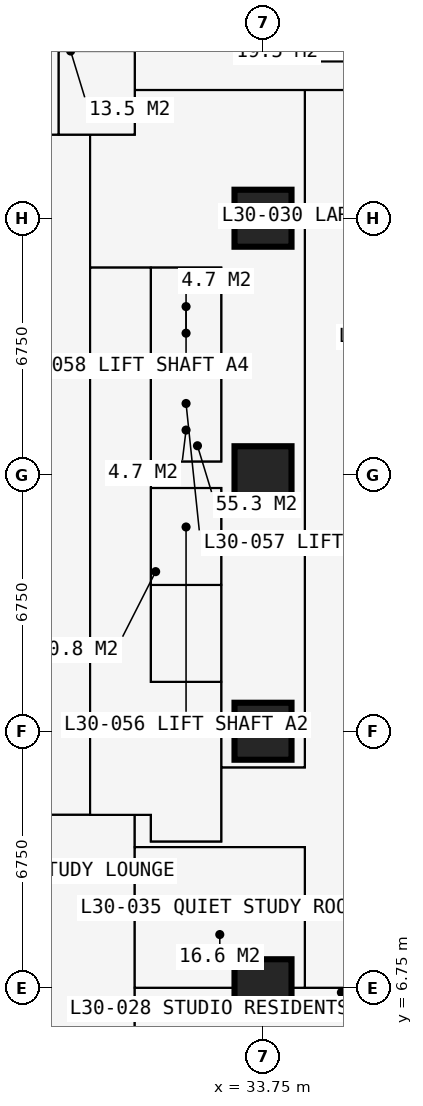
"""IFC4 building model, lengths in metres.
Left out: names, types, materials, properties, quantities, classifications, styles, units other than length and angle.
Written with IfcOpenShell. Run it as: python <this file> out.ifc"""

import sys

from ifc_helpers import new_model, si_unit, direction, frame, frame_2d, origin, origin_2d, place, context, subcontext, project, spatial, rectangle, extrude, element, fill, save


model = new_model("IFC4")
c1 = context("Model", 3, precision=1e-05, world=origin(), true_north=direction((0.0, 1.0)))
c2 = subcontext(c1, "Body", "Model", "MODEL_VIEW")
j1 = project(units=[si_unit("LENGTHUNIT", "METRE"), si_unit("PLANEANGLEUNIT", "RADIAN")], contexts=[c1])
p1 = place(None, origin())
s1 = spatial("IfcSite", under=j1, at=p1, CompositionType="ELEMENT")
p2 = place(p1, origin())
s2 = spatial("IfcBuilding", under=s1, at=p2, CompositionType="ELEMENT")
p3 = place(p2, frame((0.0, 0.0, 112.5)))
s3 = spatial("IfcBuildingStorey", under=s2, at=p3, CompositionType="ELEMENT", Elevation=112.5)
for number, where, z_axis, x_axis in (
    (1, (33.75, 6.75, 0.0), (0.0, 0.0, 1.0), (1.0, 0.0, 0.0)),
    (2, (33.75, 13.5, 0.0), (0.0, 0.0, 1.0), (1.0, 0.0, 0.0)),
    (3, (33.75, 20.25, 0.0), (0.0, 0.0, 1.0), (1.0, 0.0, 0.0)),
    (4, (33.75, 27.0, 0.0), (0.0, 0.0, 1.0), (1.0, 0.0, 0.0)),
):
    element("IfcColumn", number, at=place(p3, frame(where, z_axis=z_axis, x_axis=x_axis)), inside=s3, PredefinedType="COLUMN", context=c2, shape_type="SweptSolid", body=[
        extrude(rectangle(XDim=1.5, YDim=1.5, at=origin_2d()), origin(), (0.0, 0.0, 1.0), 3.6),
    ])
p4 = place(p3, frame((37.875, 31.125, 0.0), z_axis=(0.0, 0.0, 1.0), x_axis=(-1.0, 0.0, 0.0)))
e5 = element("IfcWall", 5, at=p4, inside=s3, PredefinedType="SOLIDWALL", context=c2, shape_type="SweptSolid", body=[
    extrude(rectangle(XDim=3.375, YDim=0.3, at=frame_2d((1.688, 0.0))), origin(), (0.0, 0.0, 1.0), 3.375),
])
p5 = place(p4, frame((0.788, 0.0, 0.6)))
e6 = element("IfcOpeningElement", 6, at=p5, cuts=e5, PredefinedType="OPENING", context=c2, shape_type="SweptSolid", body=[
    extrude(rectangle(XDim=1.8, YDim=2.1, at=frame_2d((0.9, 1.05))), frame((0.0, 0.16, 0.0), z_axis=(0.0, -1.0, 0.0), x_axis=(1.0, 0.0, 0.0)), (0.0, 0.0, 1.0), 0.32),
])
p6 = place(p3, frame((34.5, 31.125, 0.0), z_axis=(0.0, 0.0, 1.0), x_axis=(0.0, 1.0, 0.0)))
e7 = element("IfcWall", 7, at=p6, inside=s3, PredefinedType="SOLIDWALL", context=c2, shape_type="SweptSolid", body=[
    extrude(rectangle(XDim=3.375, YDim=0.3, at=frame_2d((1.688, 0.0))), origin(), (0.0, 0.0, 1.0), 3.375),
])
p7 = place(p6, frame((0.268, 0.0, 0.9)))
e8 = element("IfcOpeningElement", 8, at=p7, cuts=e7, PredefinedType="OPENING", context=c2, shape_type="SweptSolid", body=[
    extrude(rectangle(XDim=1.5, YDim=1.8, at=frame_2d((0.75, 0.9))), frame((0.0, 0.16, 0.0), z_axis=(0.0, -1.0, 0.0), x_axis=(1.0, 0.0, 0.0)), (0.0, 0.0, 1.0), 0.32),
])
p8 = place(p3, frame((10.125, 11.3, 0.0), z_axis=(0.0, 0.0, 1.0), x_axis=(1.0, 0.0, 0.0)))
e9 = element("IfcWall", 9, at=p8, inside=s3, PredefinedType="PARTITIONING", context=c2, shape_type="SweptSolid", body=[
    extrude(rectangle(XDim=20.675, YDim=0.15, at=frame_2d((10.337, 0.0))), origin(), (0.0, 0.0, 1.0), 3.375),
])
p9 = place(p8, frame((11.312, 0.0, 0.0)))
e10 = element("IfcOpeningElement", 10, at=p9, cuts=e9, PredefinedType="OPENING", context=c2, shape_type="SweptSolid", body=[
    extrude(rectangle(XDim=1.0, YDim=2.2, at=frame_2d((0.5, 1.1))), frame((0.0, 0.085, 0.0), z_axis=(0.0, -1.0, 0.0), x_axis=(1.0, 0.0, 0.0)), (0.0, 0.0, 1.0), 0.17),
])
p10 = place(p3, frame((11.3, 29.2, 0.0), z_axis=(0.0, 0.0, 1.0), x_axis=(1.0, 0.0, 0.0)))
e11 = element("IfcWall", 11, at=p10, inside=s3, PredefinedType="PARTITIONING", context=c2, shape_type="SweptSolid", body=[
    extrude(rectangle(XDim=19.075, YDim=0.1, at=frame_2d((9.538, 0.0))), origin(), (0.0, 0.0, 1.0), 3.375),
])
p11 = place(p10, frame((6.4, 0.0, 0.0)))
e12 = element("IfcOpeningElement", 12, at=p11, cuts=e11, PredefinedType="OPENING", context=c2, shape_type="SweptSolid", body=[
    extrude(rectangle(XDim=0.95, YDim=2.2, at=frame_2d((0.475, 1.1))), frame((0.0, 0.06, 0.0), z_axis=(0.0, -1.0, 0.0), x_axis=(1.0, 0.0, 0.0)), (0.0, 0.0, 1.0), 0.12),
])
p12 = place(p10, frame((13.15, 0.0, 0.0)))
e13 = element("IfcOpeningElement", 13, at=p12, cuts=e11, PredefinedType="OPENING", context=c2, shape_type="SweptSolid", body=[
    extrude(rectangle(XDim=0.95, YDim=2.2, at=frame_2d((0.475, 1.1))), frame((0.0, 0.06, 0.0), z_axis=(0.0, -1.0, 0.0), x_axis=(1.0, 0.0, 0.0)), (0.0, 0.0, 1.0), 0.12),
])
p13 = place(p10, frame((15.95, 0.0, 0.0)))
e14 = element("IfcOpeningElement", 14, at=p13, cuts=e11, PredefinedType="OPENING", context=c2, shape_type="SweptSolid", body=[
    extrude(rectangle(XDim=0.95, YDim=2.2, at=frame_2d((0.475, 1.1))), frame((0.0, 0.06, 0.0), z_axis=(0.0, -1.0, 0.0), x_axis=(1.0, 0.0, 0.0)), (0.0, 0.0, 1.0), 0.12),
])
p14 = place(p10, frame((0.6, 0.0, 0.0)))
e15 = element("IfcOpeningElement", 15, at=p14, cuts=e11, PredefinedType="OPENING", context=c2, shape_type="SweptSolid", body=[
    extrude(rectangle(XDim=1.0, YDim=2.2, at=frame_2d((0.5, 1.1))), frame((0.0, 0.06, 0.0), z_axis=(0.0, -1.0, 0.0), x_axis=(1.0, 0.0, 0.0)), (0.0, 0.0, 1.0), 0.12),
])
p15 = place(p3, frame((28.375, 29.2, 0.0), z_axis=(0.0, 0.0, 1.0), x_axis=(0.0, 1.0, 0.0)))
e16 = element("IfcWall", 16, at=p15, inside=s3, PredefinedType="PARTITIONING", context=c2, shape_type="SweptSolid", body=[
    extrude(rectangle(XDim=2.2, YDim=0.1, at=frame_2d((1.1, 0.0))), origin(), (0.0, 0.0, 1.0), 3.375),
])
p16 = place(p15, frame((0.65, 0.0, 0.0)))
e17 = element("IfcOpeningElement", 17, at=p16, cuts=e16, PredefinedType="OPENING", context=c2, shape_type="SweptSolid", body=[
    extrude(rectangle(XDim=0.9, YDim=2.2, at=frame_2d((0.45, 1.1))), frame((0.0, 0.06, 0.0), z_axis=(0.0, -1.0, 0.0), x_axis=(1.0, 0.0, 0.0)), (0.0, 0.0, 1.0), 0.12),
])
p17 = place(p3, frame((28.375, 31.4, 0.0), z_axis=(0.0, 0.0, 1.0), x_axis=(1.0, 0.0, 0.0)))
e18 = element("IfcWall", 18, at=p17, inside=s3, PredefinedType="PARTITIONING", context=c2, shape_type="SweptSolid", body=[
    extrude(rectangle(XDim=2.0, YDim=0.1, at=frame_2d((1.0, 0.0))), origin(), (0.0, 0.0, 1.0), 3.375),
])
p18 = place(p3, frame((29.2, 11.3, 0.0), z_axis=(0.0, 0.0, 1.0), x_axis=(0.0, 1.0, 0.0)))
e19 = element("IfcWall", 19, at=p18, inside=s3, PredefinedType="PARTITIONING", context=c2, shape_type="SweptSolid", body=[
    extrude(rectangle(XDim=17.9, YDim=0.2, at=frame_2d((8.95, 0.0))), origin(), (0.0, 0.0, 1.0), 3.375),
])
p19 = place(p18, frame((8.35, 0.0, 0.0)))
e20 = element("IfcOpeningElement", 20, at=p19, cuts=e19, PredefinedType="OPENING", context=c2, shape_type="SweptSolid", body=[
    extrude(rectangle(XDim=1.2, YDim=2.2, at=frame_2d((0.6, 1.1))), frame((0.0, 0.11, 0.0), z_axis=(0.0, -1.0, 0.0), x_axis=(1.0, 0.0, 0.0)), (0.0, 0.0, 1.0), 0.22),
])
p20 = place(p3, frame((29.2, 25.7, 0.0), z_axis=(0.0, 0.0, 1.0), x_axis=(1.0, 0.0, 0.0)))
e21 = element("IfcWall", 21, at=p20, inside=s3, PredefinedType="SHEAR", context=c2, shape_type="SweptSolid", body=[
    extrude(rectangle(XDim=3.45, YDim=0.1, at=frame_2d((1.725, 0.0))), origin(), (0.0, 0.0, 1.0), 3.375),
])
p21 = place(p3, frame((30.375, -0.734, 0.0), z_axis=(0.0, 0.0, 1.0), x_axis=(0.0, 1.0, 0.0)))
e22 = element("IfcWall", 22, at=p21, inside=s3, PredefinedType="PARTITIONING", context=c2, shape_type="SweptSolid", body=[
    extrude(rectangle(XDim=12.034, YDim=0.15, at=frame_2d((6.017, 0.0))), origin(), (0.0, 0.0, 1.0), 3.375),
])
p22 = place(p21, frame((5.134, 0.0, 0.0)))
e23 = element("IfcOpeningElement", 23, at=p22, cuts=e22, PredefinedType="OPENING", context=c2, shape_type="SweptSolid", body=[
    extrude(rectangle(XDim=1.0, YDim=2.2, at=frame_2d((0.5, 1.1))), frame((0.0, 0.085, 0.0), z_axis=(0.0, -1.0, 0.0), x_axis=(1.0, 0.0, 0.0)), (0.0, 0.0, 1.0), 0.17),
])
p23 = place(p3, frame((30.375, 6.75, 0.0), z_axis=(0.0, 0.0, 1.0), x_axis=(1.0, 0.0, 0.0)))
e24 = element("IfcWall", 24, at=p23, inside=s3, PredefinedType="PARTITIONING", context=c2, shape_type="SweptSolid", body=[
    extrude(rectangle(XDim=5.975, YDim=0.15, at=frame_2d((2.988, 0.0))), origin(), (0.0, 0.0, 1.0), 2.877),
])
p24 = place(p3, frame((30.375, 10.45, 0.0), z_axis=(0.0, 0.0, 1.0), x_axis=(1.0, 0.0, 0.0)))
e25 = element("IfcWall", 25, at=p24, inside=s3, PredefinedType="PARTITIONING", context=c2, shape_type="SweptSolid", body=[
    extrude(rectangle(XDim=4.475, YDim=0.15, at=frame_2d((2.238, 0.0))), origin(), (0.0, 0.0, 1.0), 3.375),
])
p25 = place(p24, frame((2.35, 0.0, 0.0)))
e26 = element("IfcOpeningElement", 26, at=p25, cuts=e25, PredefinedType="OPENING", context=c2, shape_type="SweptSolid", body=[
    extrude(rectangle(XDim=0.95, YDim=2.2, at=frame_2d((0.475, 1.1))), frame((0.0, 0.085, 0.0), z_axis=(0.0, -1.0, 0.0), x_axis=(1.0, 0.0, 0.0)), (0.0, 0.0, 1.0), 0.17),
])
p26 = place(p3, frame((30.375, 29.2, 0.0), z_axis=(0.0, 0.0, 1.0), x_axis=(0.0, 1.0, 0.0)))
e27 = element("IfcWall", 27, at=p26, inside=s3, PredefinedType="PARTITIONING", context=c2, shape_type="SweptSolid", body=[
    extrude(rectangle(XDim=5.284, YDim=0.15, at=frame_2d((2.642, 0.0))), origin(), (0.0, 0.0, 1.0), 3.375),
])
p27 = place(p3, frame((30.375, 30.375, 0.0), z_axis=(0.0, 0.0, 1.0), x_axis=(1.0, 0.0, 0.0)))
e28 = element("IfcWall", 28, at=p27, inside=s3, PredefinedType="PARTITIONING", context=c2, shape_type="SweptSolid", body=[
    extrude(rectangle(XDim=7.35, YDim=0.15, at=frame_2d((3.675, 0.0))), origin(), (0.0, 0.0, 1.0), 2.877),
])
p28 = place(p27, frame((5.225, 0.0, 0.0)))
e29 = element("IfcOpeningElement", 29, at=p28, cuts=e28, PredefinedType="OPENING", context=c2, shape_type="SweptSolid", body=[
    extrude(rectangle(XDim=1.0, YDim=2.2, at=frame_2d((0.5, 1.1))), frame((0.0, 0.085, 0.0), z_axis=(0.0, -1.0, 0.0), x_axis=(1.0, 0.0, 0.0)), (0.0, 0.0, 1.0), 0.17),
])
p29 = place(p3, frame((30.8, 10.6, 0.0), z_axis=(0.0, 0.0, 1.0), x_axis=(0.0, 1.0, 0.0)))
e30 = element("IfcWall", 30, at=p29, inside=s3, PredefinedType="PARTITIONING", context=c2, shape_type="SweptSolid", body=[
    extrude(rectangle(XDim=0.7, YDim=0.15, at=frame_2d((0.35, 0.0))), origin(), (0.0, 0.0, 1.0), 3.375),
])
p30 = place(p3, frame((30.8, 10.6, 0.0), z_axis=(0.0, 0.0, 1.0), x_axis=(1.0, 0.0, 0.0)))
e31 = element("IfcWall", 31, at=p30, inside=s3, PredefinedType="PARTITIONING", context=c2, shape_type="SweptSolid", body=[
    extrude(rectangle(XDim=1.85, YDim=0.15, at=frame_2d((0.925, 0.0))), origin(), (0.0, 0.0, 1.0), 3.375),
])
p31 = place(p3, frame((30.8, 14.8, 0.0), z_axis=(0.0, 0.0, 1.0), x_axis=(0.0, 1.0, 0.0)))
e32 = element("IfcWall", 32, at=p31, inside=s3, PredefinedType="PARTITIONING", context=c2, shape_type="SweptSolid", body=[
    extrude(rectangle(XDim=10.9, YDim=0.15, at=frame_2d((5.45, 0.0))), origin(), (0.0, 0.0, 1.0), 3.375),
])
p32 = place(p31, frame((0.75, 0.0, 0.0)))
e33 = element("IfcOpeningElement", 33, at=p32, cuts=e32, PredefinedType="OPENING", context=c2, shape_type="SweptSolid", body=[
    extrude(rectangle(XDim=1.1, YDim=2.2, at=frame_2d((0.55, 1.1))), frame((0.0, 0.085, 0.0), z_axis=(0.0, -1.0, 0.0), x_axis=(1.0, 0.0, 0.0)), (0.0, 0.0, 1.0), 0.17),
])
p33 = place(p31, frame((3.25, 0.0, 0.0)))
e34 = element("IfcOpeningElement", 34, at=p33, cuts=e32, PredefinedType="OPENING", context=c2, shape_type="SweptSolid", body=[
    extrude(rectangle(XDim=1.1, YDim=2.2, at=frame_2d((0.55, 1.1))), frame((0.0, 0.085, 0.0), z_axis=(0.0, -1.0, 0.0), x_axis=(1.0, 0.0, 0.0)), (0.0, 0.0, 1.0), 0.17),
])
p34 = place(p31, frame((6.5, 0.0, 0.0)))
e35 = element("IfcOpeningElement", 35, at=p34, cuts=e32, PredefinedType="OPENING", context=c2, shape_type="SweptSolid", body=[
    extrude(rectangle(XDim=1.1, YDim=2.2, at=frame_2d((0.55, 1.1))), frame((0.0, 0.085, 0.0), z_axis=(0.0, -1.0, 0.0), x_axis=(1.0, 0.0, 0.0)), (0.0, 0.0, 1.0), 0.17),
])
p35 = place(p31, frame((9.05, 0.0, 0.0)))
e36 = element("IfcOpeningElement", 36, at=p35, cuts=e32, PredefinedType="OPENING", context=c2, shape_type="SweptSolid", body=[
    extrude(rectangle(XDim=1.1, YDim=2.2, at=frame_2d((0.55, 1.1))), frame((0.0, 0.085, 0.0), z_axis=(0.0, -1.0, 0.0), x_axis=(1.0, 0.0, 0.0)), (0.0, 0.0, 1.0), 0.17),
])
for number, where, z_axis, x_axis in (
    (37, (30.8, 14.8, 0.0), (0.0, 0.0, 1.0), (1.0, 0.0, 0.0)),
    (38, (30.8, 17.35, 0.0), (0.0, 0.0, 1.0), (1.0, 0.0, 0.0)),
    (39, (30.8, 19.9, 0.0), (0.0, 0.0, 1.0), (1.0, 0.0, 0.0)),
    (40, (30.8, 20.6, 0.0), (0.0, 0.0, 1.0), (1.0, 0.0, 0.0)),
    (41, (30.8, 23.15, 0.0), (0.0, 0.0, 1.0), (1.0, 0.0, 0.0)),
):
    element("IfcWall", number, at=place(p3, frame(where, z_axis=z_axis, x_axis=x_axis)), inside=s3, PredefinedType="SHEAR", context=c2, shape_type="SweptSolid", body=[
        extrude(rectangle(XDim=1.85, YDim=0.1, at=frame_2d((0.925, 0.0))), origin(), (0.0, 0.0, 1.0), 3.375),
    ])
p36 = place(p3, frame((32.65, 10.6, 0.0), z_axis=(0.0, 0.0, 1.0), x_axis=(0.0, 1.0, 0.0)))
e42 = element("IfcWall", 42, at=p36, inside=s3, PredefinedType="SHEAR", context=c2, shape_type="SweptSolid", body=[
    extrude(rectangle(XDim=9.3, YDim=0.1, at=frame_2d((4.65, 0.0))), origin(), (0.0, 0.0, 1.0), 3.375),
])
p37 = place(p36, frame((0.5, 0.0, 0.0)))
e43 = element("IfcOpeningElement", 43, at=p37, cuts=e42, PredefinedType="OPENING", context=c2, shape_type="SweptSolid", body=[
    extrude(rectangle(XDim=1.0, YDim=2.2, at=frame_2d((0.5, 1.1))), frame((0.0, 0.06, 0.0), z_axis=(0.0, -1.0, 0.0), x_axis=(1.0, 0.0, 0.0)), (0.0, 0.0, 1.0), 0.12),
])
p38 = place(p3, frame((32.65, 12.55, 0.0), z_axis=(0.0, 0.0, 1.0), x_axis=(1.0, 0.0, 0.0)))
e44 = element("IfcWall", 44, at=p38, inside=s3, PredefinedType="PARTITIONING", context=c2, shape_type="SweptSolid", body=[
    extrude(rectangle(XDim=2.2, YDim=0.15, at=frame_2d((1.1, 0.0))), origin(), (0.0, 0.0, 1.0), 3.375),
])
p39 = place(p3, frame((32.65, 20.6, 0.0), z_axis=(0.0, 0.0, 1.0), x_axis=(0.0, 1.0, 0.0)))
e45 = element("IfcWall", 45, at=p39, inside=s3, PredefinedType="PARTITIONING", context=c2, shape_type="SweptSolid", body=[
    extrude(rectangle(XDim=5.1, YDim=0.15, at=frame_2d((2.55, 0.0))), origin(), (0.0, 0.0, 1.0), 3.375),
])
p40 = place(p3, frame((34.85, 6.75, 0.0), z_axis=(0.0, 0.0, 1.0), x_axis=(0.0, 1.0, 0.0)))
e46 = element("IfcWall", 46, at=p40, inside=s3, PredefinedType="PARTITIONING", context=c2, shape_type="SweptSolid", body=[
    extrude(rectangle(XDim=3.7, YDim=0.15, at=frame_2d((1.85, 0.0))), origin(), (0.0, 0.0, 1.0), 3.375),
])
p41 = place(p3, frame((34.85, 12.55, 0.0), z_axis=(0.0, 0.0, 1.0), x_axis=(0.0, 1.0, 0.0)))
e47 = element("IfcWall", 47, at=p41, inside=s3, PredefinedType="PARTITIONING", context=c2, shape_type="SweptSolid", body=[
    extrude(rectangle(XDim=17.825, YDim=0.15, at=frame_2d((8.913, 0.0))), origin(), (0.0, 0.0, 1.0), 3.375),
])
p42 = place(p41, frame((8.5, 0.0, 0.0)))
e48 = element("IfcOpeningElement", 48, at=p42, cuts=e47, PredefinedType="OPENING", context=c2, shape_type="SweptSolid", body=[
    extrude(rectangle(XDim=0.95, YDim=2.2, at=frame_2d((0.475, 1.1))), frame((0.0, 0.085, 0.0), z_axis=(0.0, -1.0, 0.0), x_axis=(1.0, 0.0, 0.0)), (0.0, 0.0, 1.0), 0.17),
])
p43 = place(p5, origin())
e49 = element("IfcWindow", 49, at=p43, inside=s3, PartitioningType="SINGLE_PANEL", PredefinedType="WINDOW", context=c2, shape_type="SweptSolid", body=[
    extrude(rectangle(XDim=1.8, YDim=2.1, at=frame_2d((0.9, 1.05))), frame((0.0, 0.03, 0.0), z_axis=(0.0, -1.0, 0.0), x_axis=(1.0, 0.0, 0.0)), (0.0, 0.0, 1.0), 0.06),
])
fill(e6, e49)
p44 = place(p37, origin())
e50 = element("IfcDoor", 50, at=p44, inside=s3, OperationType="SINGLE_SWING_LEFT", PredefinedType="DOOR", context=c2, shape_type="SweptSolid", body=[
    extrude(rectangle(XDim=1.0, YDim=2.2, at=frame_2d((0.5, 1.1))), frame((0.0, 0.025, 0.0), z_axis=(0.0, -1.0, 0.0), x_axis=(1.0, 0.0, 0.0)), (0.0, 0.0, 1.0), 0.05),
])
fill(e43, e50)
p45 = place(p42, origin())
e51 = element("IfcDoor", 51, at=p45, inside=s3, OperationType="SINGLE_SWING_LEFT", PredefinedType="DOOR", context=c2, shape_type="SweptSolid", body=[
    extrude(rectangle(XDim=0.95, YDim=2.2, at=frame_2d((0.475, 1.1))), frame((0.0, 0.025, 0.0), z_axis=(0.0, -1.0, 0.0), x_axis=(1.0, 0.0, 0.0)), (0.0, 0.0, 1.0), 0.05),
])
fill(e48, e51)
p46 = place(p25, origin())
e52 = element("IfcDoor", 52, at=p46, inside=s3, OperationType="SINGLE_SWING_LEFT", PredefinedType="DOOR", context=c2, shape_type="SweptSolid", body=[
    extrude(rectangle(XDim=0.95, YDim=2.2, at=frame_2d((0.475, 1.1))), frame((0.0, 0.025, 0.0), z_axis=(0.0, -1.0, 0.0), x_axis=(1.0, 0.0, 0.0)), (0.0, 0.0, 1.0), 0.05),
])
fill(e26, e52)
p47 = place(p28, origin())
e53 = element("IfcDoor", 53, at=p47, inside=s3, OperationType="SINGLE_SWING_LEFT", PredefinedType="DOOR", context=c2, shape_type="SweptSolid", body=[
    extrude(rectangle(XDim=1.0, YDim=2.2, at=frame_2d((0.5, 1.1))), frame((0.0, 0.025, 0.0), z_axis=(0.0, -1.0, 0.0), x_axis=(1.0, 0.0, 0.0)), (0.0, 0.0, 1.0), 0.05),
])
fill(e29, e53)
p48 = place(p13, origin())
e54 = element("IfcDoor", 54, at=p48, inside=s3, OperationType="SINGLE_SWING_LEFT", PredefinedType="DOOR", context=c2, shape_type="SweptSolid", body=[
    extrude(rectangle(XDim=0.95, YDim=2.2, at=frame_2d((0.475, 1.1))), frame((0.0, 0.025, 0.0), z_axis=(0.0, -1.0, 0.0), x_axis=(1.0, 0.0, 0.0)), (0.0, 0.0, 1.0), 0.05),
])
fill(e14, e54)
p49 = place(p16, origin())
e55 = element("IfcDoor", 55, at=p49, inside=s3, OperationType="SINGLE_SWING_RIGHT", PredefinedType="DOOR", context=c2, shape_type="SweptSolid", body=[
    extrude(rectangle(XDim=0.9, YDim=2.2, at=frame_2d((0.45, 1.1))), frame((0.0, 0.025, 0.0), z_axis=(0.0, -1.0, 0.0), x_axis=(1.0, 0.0, 0.0)), (0.0, 0.0, 1.0), 0.05),
])
fill(e17, e55)
p50 = place(p32, origin())
e56 = element("IfcDoor", 56, at=p50, inside=s3, OperationType="DOUBLE_DOOR_SLIDING", PredefinedType="DOOR", context=c2, shape_type="SweptSolid", body=[
    extrude(rectangle(XDim=1.1, YDim=2.2, at=frame_2d((0.55, 1.1))), frame((0.0, 0.025, 0.0), z_axis=(0.0, -1.0, 0.0), x_axis=(1.0, 0.0, 0.0)), (0.0, 0.0, 1.0), 0.05),
])
fill(e33, e56)
p51 = place(p33, origin())
e57 = element("IfcDoor", 57, at=p51, inside=s3, OperationType="DOUBLE_DOOR_SLIDING", PredefinedType="DOOR", context=c2, shape_type="SweptSolid", body=[
    extrude(rectangle(XDim=1.1, YDim=2.2, at=frame_2d((0.55, 1.1))), frame((0.0, 0.025, 0.0), z_axis=(0.0, -1.0, 0.0), x_axis=(1.0, 0.0, 0.0)), (0.0, 0.0, 1.0), 0.05),
])
fill(e34, e57)
p52 = place(p34, origin())
e58 = element("IfcDoor", 58, at=p52, inside=s3, OperationType="DOUBLE_DOOR_SLIDING", PredefinedType="DOOR", context=c2, shape_type="SweptSolid", body=[
    extrude(rectangle(XDim=1.1, YDim=2.2, at=frame_2d((0.55, 1.1))), frame((0.0, 0.025, 0.0), z_axis=(0.0, -1.0, 0.0), x_axis=(1.0, 0.0, 0.0)), (0.0, 0.0, 1.0), 0.05),
])
fill(e35, e58)
p53 = place(p35, origin())
e59 = element("IfcDoor", 59, at=p53, inside=s3, OperationType="DOUBLE_DOOR_SLIDING", PredefinedType="DOOR", context=c2, shape_type="SweptSolid", body=[
    extrude(rectangle(XDim=1.1, YDim=2.2, at=frame_2d((0.55, 1.1))), frame((0.0, 0.025, 0.0), z_axis=(0.0, -1.0, 0.0), x_axis=(1.0, 0.0, 0.0)), (0.0, 0.0, 1.0), 0.05),
])
fill(e36, e59)
p54 = place(p19, origin())
e60 = element("IfcDoor", 60, at=p54, inside=s3, OperationType="DOUBLE_DOOR_SINGLE_SWING", PredefinedType="DOOR", context=c2, shape_type="SweptSolid", body=[
    extrude(rectangle(XDim=1.2, YDim=2.2, at=frame_2d((0.6, 1.1))), frame((0.0, 0.025, 0.0), z_axis=(0.0, -1.0, 0.0), x_axis=(1.0, 0.0, 0.0)), (0.0, 0.0, 1.0), 0.05),
])
fill(e20, e60)
save(model, sys.argv[1])
